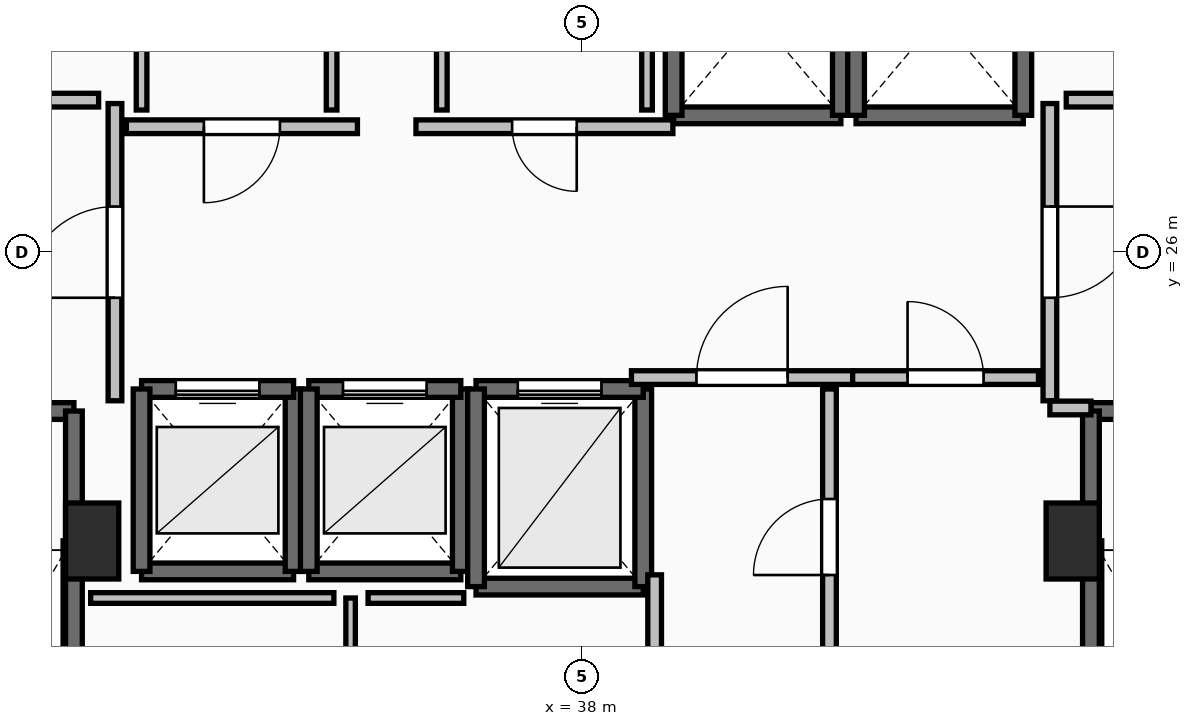
"""IFC4 building model, lengths in metres.
Left out: names, types, materials, properties, quantities, classifications, styles, units other than length and angle.
Written with IfcOpenShell. Run it as: python <this file> out.ifc"""

import sys

from ifc_helpers import new_model, si_unit, direction, frame, frame_2d, origin, origin_2d, place, context, subcontext, project, spatial, rectangle, extrude, element, fill, save


model = new_model("IFC4")
c1 = context("Model", 3, precision=1e-05, world=origin(), true_north=direction((0.0, 1.0)))
c2 = subcontext(c1, "Body", "Model", "MODEL_VIEW")
j1 = project(units=[si_unit("LENGTHUNIT", "METRE"), si_unit("PLANEANGLEUNIT", "RADIAN")], contexts=[c1])
p1 = place(None, origin())
s1 = spatial("IfcSite", under=j1, at=p1, CompositionType="ELEMENT")
p2 = place(p1, origin())
s2 = spatial("IfcBuilding", under=s1, at=p2, CompositionType="ELEMENT")
p3 = place(p2, frame((0.0, 0.0, 217.85)))
s3 = spatial("IfcBuildingStorey", under=s2, at=p3, CompositionType="ELEMENT", Elevation=217.85)
for number, where, z_axis, x_axis in (
    (1, (31.55, 22.2, 0.0), (0.0, 0.0, 1.0), (1.0, 0.0, 0.0)),
    (2, (44.45, 22.2, 0.0), (0.0, 0.0, 1.0), (1.0, 0.0, 0.0)),
):
    element("IfcColumn", number, at=place(p3, frame(where, z_axis=z_axis, x_axis=x_axis)), inside=s3, PredefinedType="PILASTER", context=c2, shape_type="SweptSolid", body=[
        extrude(rectangle(XDim=0.7, YDim=1.0, at=origin_2d()), origin(), (0.0, 0.0, 1.0), 3.55),
    ])
p4 = place(p3, frame((27.94, 23.91, 0.0), z_axis=(0.0, 0.0, 1.0), x_axis=(1.0, 0.0, 0.0)))
e3 = element("IfcWall", 3, at=p4, inside=s3, PredefinedType="SOLIDWALL", context=c2, shape_type="SweptSolid", body=[
    extrude(rectangle(XDim=3.37, YDim=0.22, at=frame_2d((1.685, 0.0))), origin(), (0.0, 0.0, 1.0), 3.29),
])
p5 = place(p4, frame((1.135, 0.0, 0.0)))
e4 = element("IfcOpeningElement", 4, at=p5, cuts=e3, PredefinedType="OPENING", context=c2, shape_type="SweptSolid", body=[
    extrude(rectangle(XDim=1.1, YDim=2.15, at=frame_2d((0.55, 1.075))), frame((0.0, 0.125, 0.0), z_axis=(0.0, -1.0, 0.0), x_axis=(1.0, 0.0, 0.0)), (0.0, 0.0, 1.0), 0.25),
])
p6 = place(p3, frame((31.31, 23.91, 0.0), z_axis=(0.0, 0.0, 1.0), x_axis=(0.0, -1.0, 0.0)))
e5 = element("IfcWall", 5, at=p6, inside=s3, PredefinedType="SOLIDWALL", context=c2, shape_type="SweptSolid", body=[
    extrude(rectangle(XDim=7.42, YDim=0.22, at=frame_2d((3.71, 0.0))), origin(), (0.0, 0.0, 1.0), 3.29),
])
p7 = place(p3, frame((44.69, 23.91, 0.0), z_axis=(0.0, 0.0, 1.0), x_axis=(1.0, 0.0, 0.0)))
e6 = element("IfcWall", 6, at=p7, inside=s3, PredefinedType="SOLIDWALL", context=c2, shape_type="SweptSolid", body=[
    extrude(rectangle(XDim=3.37, YDim=0.22, at=frame_2d((1.685, 0.0))), origin(), (0.0, 0.0, 1.0), 3.29),
])
p8 = place(p7, frame((1.135, 0.0, 0.0)))
e7 = element("IfcOpeningElement", 7, at=p8, cuts=e6, PredefinedType="OPENING", context=c2, shape_type="SweptSolid", body=[
    extrude(rectangle(XDim=1.1, YDim=2.15, at=frame_2d((0.55, 1.075))), frame((0.0, 0.125, 0.0), z_axis=(0.0, -1.0, 0.0), x_axis=(1.0, 0.0, 0.0)), (0.0, 0.0, 1.0), 0.25),
])
p9 = place(p3, frame((44.69, 16.49, 0.0), z_axis=(0.0, 0.0, 1.0), x_axis=(0.0, 1.0, 0.0)))
e8 = element("IfcWall", 8, at=p9, inside=s3, PredefinedType="SOLIDWALL", context=c2, shape_type="SweptSolid", body=[
    extrude(rectangle(XDim=7.42, YDim=0.22, at=frame_2d((3.71, 0.0))), origin(), (0.0, 0.0, 1.0), 3.29),
])
p10 = place(p3, frame((32.2, 21.8, 0.0), z_axis=(0.0, 0.0, 1.0), x_axis=(1.0, 0.0, 0.0)))
e9 = element("IfcWall", 9, at=p10, inside=s3, PredefinedType="SOLIDWALL", context=c2, shape_type="SweptSolid", body=[
    extrude(rectangle(XDim=2.0, YDim=0.22, at=frame_2d((1.0, 0.0))), origin(), (0.0, 0.0, 1.0), 3.29),
])
p11 = place(p3, frame((34.2, 21.8, 0.0), z_axis=(0.0, 0.0, 1.0), x_axis=(0.0, 1.0, 0.0)))
e10 = element("IfcWall", 10, at=p11, inside=s3, PredefinedType="SOLIDWALL", context=c2, shape_type="SweptSolid", body=[
    extrude(rectangle(XDim=2.4, YDim=0.22, at=frame_2d((1.2, 0.0))), origin(), (0.0, 0.0, 1.0), 3.29),
])
p12 = place(p3, frame((34.2, 24.2, 0.0), z_axis=(0.0, 0.0, 1.0), x_axis=(-1.0, 0.0, 0.0)))
e11 = element("IfcWall", 11, at=p12, inside=s3, PredefinedType="SOLIDWALL", context=c2, shape_type="SweptSolid", body=[
    extrude(rectangle(XDim=2.0, YDim=0.22, at=frame_2d((1.0, 0.0))), origin(), (0.0, 0.0, 1.0), 3.29),
])
p13 = place(p12, frame((0.45, 0.0, 0.0)))
e12 = element("IfcOpeningElement", 12, at=p13, cuts=e11, PredefinedType="OPENING", context=c2, shape_type="SweptSolid", body=[
    extrude(rectangle(XDim=1.1, YDim=2.2, at=frame_2d((0.55, 1.1))), frame((0.0, 0.125, 0.0), z_axis=(0.0, -1.0, 0.0), x_axis=(1.0, 0.0, 0.0)), (0.0, 0.0, 1.0), 0.25),
])
p14 = place(p3, frame((32.2, 24.2, 0.0), z_axis=(0.0, 0.0, 1.0), x_axis=(0.0, -1.0, 0.0)))
e13 = element("IfcWall", 13, at=p14, inside=s3, PredefinedType="SOLIDWALL", context=c2, shape_type="SweptSolid", body=[
    extrude(rectangle(XDim=2.4, YDim=0.22, at=frame_2d((1.2, 0.0))), origin(), (0.0, 0.0, 1.0), 3.29),
])
p15 = place(p3, frame((34.4, 21.8, 0.0), z_axis=(0.0, 0.0, 1.0), x_axis=(1.0, 0.0, 0.0)))
e14 = element("IfcWall", 14, at=p15, inside=s3, PredefinedType="SOLIDWALL", context=c2, shape_type="SweptSolid", body=[
    extrude(rectangle(XDim=2.0, YDim=0.22, at=frame_2d((1.0, 0.0))), origin(), (0.0, 0.0, 1.0), 3.29),
])
p16 = place(p3, frame((36.4, 21.8, 0.0), z_axis=(0.0, 0.0, 1.0), x_axis=(0.0, 1.0, 0.0)))
e15 = element("IfcWall", 15, at=p16, inside=s3, PredefinedType="SOLIDWALL", context=c2, shape_type="SweptSolid", body=[
    extrude(rectangle(XDim=2.4, YDim=0.22, at=frame_2d((1.2, 0.0))), origin(), (0.0, 0.0, 1.0), 3.29),
])
p17 = place(p3, frame((36.4, 24.2, 0.0), z_axis=(0.0, 0.0, 1.0), x_axis=(-1.0, 0.0, 0.0)))
e16 = element("IfcWall", 16, at=p17, inside=s3, PredefinedType="SOLIDWALL", context=c2, shape_type="SweptSolid", body=[
    extrude(rectangle(XDim=2.0, YDim=0.22, at=frame_2d((1.0, 0.0))), origin(), (0.0, 0.0, 1.0), 3.29),
])
p18 = place(p17, frame((0.45, 0.0, 0.0)))
e17 = element("IfcOpeningElement", 17, at=p18, cuts=e16, PredefinedType="OPENING", context=c2, shape_type="SweptSolid", body=[
    extrude(rectangle(XDim=1.1, YDim=2.2, at=frame_2d((0.55, 1.1))), frame((0.0, 0.125, 0.0), z_axis=(0.0, -1.0, 0.0), x_axis=(1.0, 0.0, 0.0)), (0.0, 0.0, 1.0), 0.25),
])
p19 = place(p3, frame((34.4, 24.2, 0.0), z_axis=(0.0, 0.0, 1.0), x_axis=(0.0, -1.0, 0.0)))
e18 = element("IfcWall", 18, at=p19, inside=s3, PredefinedType="SOLIDWALL", context=c2, shape_type="SweptSolid", body=[
    extrude(rectangle(XDim=2.4, YDim=0.22, at=frame_2d((1.2, 0.0))), origin(), (0.0, 0.0, 1.0), 3.29),
])
p20 = place(p3, frame((36.6, 21.6, 0.0), z_axis=(0.0, 0.0, 1.0), x_axis=(1.0, 0.0, 0.0)))
e19 = element("IfcWall", 19, at=p20, inside=s3, PredefinedType="SOLIDWALL", context=c2, shape_type="SweptSolid", body=[
    extrude(rectangle(XDim=2.2, YDim=0.22, at=frame_2d((1.1, 0.0))), origin(), (0.0, 0.0, 1.0), 3.29),
])
p21 = place(p3, frame((38.8, 21.6, 0.0), z_axis=(0.0, 0.0, 1.0), x_axis=(0.0, 1.0, 0.0)))
e20 = element("IfcWall", 20, at=p21, inside=s3, PredefinedType="SOLIDWALL", context=c2, shape_type="SweptSolid", body=[
    extrude(rectangle(XDim=2.6, YDim=0.22, at=frame_2d((1.3, 0.0))), origin(), (0.0, 0.0, 1.0), 3.29),
])
p22 = place(p3, frame((38.8, 24.2, 0.0), z_axis=(0.0, 0.0, 1.0), x_axis=(-1.0, 0.0, 0.0)))
e21 = element("IfcWall", 21, at=p22, inside=s3, PredefinedType="SOLIDWALL", context=c2, shape_type="SweptSolid", body=[
    extrude(rectangle(XDim=2.2, YDim=0.22, at=frame_2d((1.1, 0.0))), origin(), (0.0, 0.0, 1.0), 3.29),
])
p23 = place(p22, frame((0.55, 0.0, 0.0)))
e22 = element("IfcOpeningElement", 22, at=p23, cuts=e21, PredefinedType="OPENING", context=c2, shape_type="SweptSolid", body=[
    extrude(rectangle(XDim=1.1, YDim=2.2, at=frame_2d((0.55, 1.1))), frame((0.0, 0.125, 0.0), z_axis=(0.0, -1.0, 0.0), x_axis=(1.0, 0.0, 0.0)), (0.0, 0.0, 1.0), 0.25),
])
p24 = place(p3, frame((36.6, 24.2, 0.0), z_axis=(0.0, 0.0, 1.0), x_axis=(0.0, -1.0, 0.0)))
e23 = element("IfcWall", 23, at=p24, inside=s3, PredefinedType="SOLIDWALL", context=c2, shape_type="SweptSolid", body=[
    extrude(rectangle(XDim=2.6, YDim=0.22, at=frame_2d((1.3, 0.0))), origin(), (0.0, 0.0, 1.0), 3.29),
])
p25 = place(p3, frame((39.2, 27.8, 0.0), z_axis=(0.0, 0.0, 1.0), x_axis=(1.0, 0.0, 0.0)))
e24 = element("IfcWall", 24, at=p25, inside=s3, PredefinedType="SOLIDWALL", context=c2, shape_type="SweptSolid", body=[
    extrude(rectangle(XDim=2.2, YDim=0.22, at=frame_2d((1.1, 0.0))), origin(), (0.0, 0.0, 1.0), 3.29),
])
for number, where, z_axis, x_axis in (
    (25, (41.4, 27.8, 0.0), (0.0, 0.0, 1.0), (0.0, 1.0, 0.0)),
    (26, (39.2, 30.4, 0.0), (0.0, 0.0, 1.0), (0.0, -1.0, 0.0)),
):
    element("IfcWall", number, at=place(p3, frame(where, z_axis=z_axis, x_axis=x_axis)), inside=s3, PredefinedType="SOLIDWALL", context=c2, shape_type="SweptSolid", body=[
        extrude(rectangle(XDim=2.6, YDim=0.22, at=frame_2d((1.3, 0.0))), origin(), (0.0, 0.0, 1.0), 3.29),
    ])
p26 = place(p3, frame((41.6, 27.8, 0.0), z_axis=(0.0, 0.0, 1.0), x_axis=(1.0, 0.0, 0.0)))
e27 = element("IfcWall", 27, at=p26, inside=s3, PredefinedType="SOLIDWALL", context=c2, shape_type="SweptSolid", body=[
    extrude(rectangle(XDim=2.2, YDim=0.22, at=frame_2d((1.1, 0.0))), origin(), (0.0, 0.0, 1.0), 3.29),
])
for number, where, z_axis, x_axis in (
    (28, (43.8, 27.8, 0.0), (0.0, 0.0, 1.0), (0.0, 1.0, 0.0)),
    (29, (41.6, 30.4, 0.0), (0.0, 0.0, 1.0), (0.0, -1.0, 0.0)),
):
    element("IfcWall", number, at=place(p3, frame(where, z_axis=z_axis, x_axis=x_axis)), inside=s3, PredefinedType="SOLIDWALL", context=c2, shape_type="SweptSolid", body=[
        extrude(rectangle(XDim=2.6, YDim=0.22, at=frame_2d((1.3, 0.0))), origin(), (0.0, 0.0, 1.0), 3.29),
    ])
p27 = place(p3, frame((31.85, 24.045, 0.0), z_axis=(0.0, 0.0, 1.0), x_axis=(0.0, 1.0, 0.0)))
e30 = element("IfcWall", 30, at=p27, inside=s3, PredefinedType="PARTITIONING", context=c2, shape_type="SweptSolid", body=[
    extrude(rectangle(XDim=3.91, YDim=0.18, at=frame_2d((1.955, 0.0))), origin(), (0.0, 0.0, 1.0), 3.29),
])
p28 = place(p27, frame((1.355, 0.0, 0.0)))
e31 = element("IfcOpeningElement", 31, at=p28, cuts=e30, PredefinedType="OPENING", context=c2, shape_type="SweptSolid", body=[
    extrude(rectangle(XDim=1.2, YDim=2.15, at=frame_2d((0.6, 1.075))), frame((0.0, 0.105, 0.0), z_axis=(0.0, -1.0, 0.0), x_axis=(1.0, 0.0, 0.0)), (0.0, 0.0, 1.0), 0.21),
])
p29 = place(p3, frame((44.15, 27.955, 0.0), z_axis=(0.0, 0.0, 1.0), x_axis=(0.0, -1.0, 0.0)))
e32 = element("IfcWall", 32, at=p29, inside=s3, PredefinedType="PARTITIONING", context=c2, shape_type="SweptSolid", body=[
    extrude(rectangle(XDim=3.91, YDim=0.18, at=frame_2d((1.955, 0.0))), origin(), (0.0, 0.0, 1.0), 3.29),
])
p30 = place(p29, frame((1.355, 0.0, 0.0)))
e33 = element("IfcOpeningElement", 33, at=p30, cuts=e32, PredefinedType="OPENING", context=c2, shape_type="SweptSolid", body=[
    extrude(rectangle(XDim=1.2, YDim=2.15, at=frame_2d((0.6, 1.075))), frame((0.0, 0.105, 0.0), z_axis=(0.0, -1.0, 0.0), x_axis=(1.0, 0.0, 0.0)), (0.0, 0.0, 1.0), 0.21),
])
p31 = place(p3, frame((44.15, 23.95, 0.0), z_axis=(0.0, 0.0, 1.0), x_axis=(1.0, 0.0, 0.0)))
e34 = element("IfcWall", 34, at=p31, inside=s3, PredefinedType="PARTITIONING", context=c2, shape_type="SweptSolid", body=[
    extrude(rectangle(XDim=0.54, YDim=0.18, at=frame_2d((0.27, 0.0))), origin(), (0.0, 0.0, 1.0), 3.29),
])
p32 = place(p3, frame((38.645, 24.35, 0.0), z_axis=(0.0, 0.0, 1.0), x_axis=(1.0, 0.0, 0.0)))
e35 = element("IfcWall", 35, at=p32, inside=s3, PredefinedType="PARTITIONING", context=c2, shape_type="SweptSolid", body=[
    extrude(rectangle(XDim=2.91, YDim=0.18, at=frame_2d((1.455, 0.0))), origin(), (0.0, 0.0, 1.0), 3.29),
])
p33 = place(p32, frame((0.855, 0.0, 0.0)))
e36 = element("IfcOpeningElement", 36, at=p33, cuts=e35, PredefinedType="OPENING", context=c2, shape_type="SweptSolid", body=[
    extrude(rectangle(XDim=1.2, YDim=2.15, at=frame_2d((0.6, 1.075))), frame((0.0, 0.105, 0.0), z_axis=(0.0, -1.0, 0.0), x_axis=(1.0, 0.0, 0.0)), (0.0, 0.0, 1.0), 0.21),
])
p34 = place(p3, frame((41.555, 24.35, 0.0), z_axis=(0.0, 0.0, 1.0), x_axis=(1.0, 0.0, 0.0)))
e37 = element("IfcWall", 37, at=p34, inside=s3, PredefinedType="PARTITIONING", context=c2, shape_type="SweptSolid", body=[
    extrude(rectangle(XDim=2.445, YDim=0.18, at=frame_2d((1.223, 0.0))), origin(), (0.0, 0.0, 1.0), 3.29),
])
p35 = place(p34, frame((0.722, 0.0, 0.0)))
e38 = element("IfcOpeningElement", 38, at=p35, cuts=e37, PredefinedType="OPENING", context=c2, shape_type="SweptSolid", body=[
    extrude(rectangle(XDim=1.0, YDim=2.15, at=frame_2d((0.5, 1.075))), frame((0.0, 0.105, 0.0), z_axis=(0.0, -1.0, 0.0), x_axis=(1.0, 0.0, 0.0)), (0.0, 0.0, 1.0), 0.21),
])
p36 = place(p3, frame((35.04, 27.65, 0.0), z_axis=(0.0, 0.0, 1.0), x_axis=(-1.0, 0.0, 0.0)))
e39 = element("IfcWall", 39, at=p36, inside=s3, PredefinedType="PARTITIONING", context=c2, shape_type="SweptSolid", body=[
    extrude(rectangle(XDim=3.04, YDim=0.18, at=frame_2d((1.52, 0.0))), origin(), (0.0, 0.0, 1.0), 3.29),
])
p37 = place(p36, frame((1.02, 0.0, 0.0)))
e40 = element("IfcOpeningElement", 40, at=p37, cuts=e39, PredefinedType="OPENING", context=c2, shape_type="SweptSolid", body=[
    extrude(rectangle(XDim=1.0, YDim=2.15, at=frame_2d((0.5, 1.075))), frame((0.0, 0.105, 0.0), z_axis=(0.0, -1.0, 0.0), x_axis=(1.0, 0.0, 0.0)), (0.0, 0.0, 1.0), 0.21),
])
p38 = place(p3, frame((39.19, 27.65, 0.0), z_axis=(0.0, 0.0, 1.0), x_axis=(-1.0, 0.0, 0.0)))
e41 = element("IfcWall", 41, at=p38, inside=s3, PredefinedType="PARTITIONING", context=c2, shape_type="SweptSolid", body=[
    extrude(rectangle(XDim=3.38, YDim=0.18, at=frame_2d((1.69, 0.0))), origin(), (0.0, 0.0, 1.0), 3.29),
])
p39 = place(p38, frame((1.265, 0.0, 0.0)))
e42 = element("IfcOpeningElement", 42, at=p39, cuts=e41, PredefinedType="OPENING", context=c2, shape_type="SweptSolid", body=[
    extrude(rectangle(XDim=0.85, YDim=2.1, at=frame_2d((0.425, 1.05))), frame((0.0, 0.105, 0.0), z_axis=(0.0, -1.0, 0.0), x_axis=(1.0, 0.0, 0.0)), (0.0, 0.0, 1.0), 0.21),
])
p40 = place(p3, frame((41.25, 20.305, 0.0), z_axis=(0.0, 0.0, 1.0), x_axis=(0.0, 1.0, 0.0)))
e43 = element("IfcWall", 43, at=p40, inside=s3, PredefinedType="PARTITIONING", context=c2, shape_type="SweptSolid", body=[
    extrude(rectangle(XDim=3.895, YDim=0.18, at=frame_2d((1.948, 0.0))), origin(), (0.0, 0.0, 1.0), 3.29),
])
p41 = place(p40, frame((1.448, 0.0, 0.0)))
e44 = element("IfcOpeningElement", 44, at=p41, cuts=e43, PredefinedType="OPENING", context=c2, shape_type="SweptSolid", body=[
    extrude(rectangle(XDim=1.0, YDim=2.15, at=frame_2d((0.5, 1.075))), frame((0.0, 0.105, 0.0), z_axis=(0.0, -1.0, 0.0), x_axis=(1.0, 0.0, 0.0)), (0.0, 0.0, 1.0), 0.21),
])
p42 = place(p3, frame((38.95, 21.755, 0.0), z_axis=(0.0, 0.0, 1.0), x_axis=(0.0, -1.0, 0.0)))
e45 = element("IfcWall", 45, at=p42, inside=s3, PredefinedType="PARTITIONING", context=c2, shape_type="SweptSolid", body=[
    extrude(rectangle(XDim=5.435, YDim=0.18, at=frame_2d((2.717, 0.0))), origin(), (0.0, 0.0, 1.0), 3.29),
])
p43 = place(p42, frame((2.218, 0.0, 0.0)))
e46 = element("IfcOpeningElement", 46, at=p43, cuts=e45, PredefinedType="OPENING", context=c2, shape_type="SweptSolid", body=[
    extrude(rectangle(XDim=1.0, YDim=2.15, at=frame_2d((0.5, 1.075))), frame((0.0, 0.105, 0.0), z_axis=(0.0, -1.0, 0.0), x_axis=(1.0, 0.0, 0.0)), (0.0, 0.0, 1.0), 0.21),
])
p44 = place(p3, frame((34.95, 16.32, 0.0), z_axis=(0.0, 0.0, 1.0), x_axis=(0.0, 1.0, 0.0)))
e47 = element("IfcWall", 47, at=p44, inside=s3, PredefinedType="PARTITIONING", context=c2, shape_type="SweptSolid", body=[
    extrude(rectangle(XDim=5.13, YDim=0.125, at=frame_2d((2.565, 0.0))), origin(), (0.0, 0.0, 1.0), 3.29),
])
for number, where, z_axis, x_axis in (
    (48, (31.635, 28.0, 0.0), (0.0, 0.0, 1.0), (-1.0, 0.0, 0.0)),
    (49, (45.28, 28.0, 0.0), (0.0, 0.0, 1.0), (-1.0, 0.0, 0.0)),
):
    element("IfcWall", number, at=place(p3, frame(where, z_axis=z_axis, x_axis=x_axis)), inside=s3, PredefinedType="PARTITIONING", context=c2, shape_type="SweptSolid", body=[
        extrude(rectangle(XDim=0.915, YDim=0.18, at=frame_2d((0.458, 0.0))), origin(), (0.0, 0.0, 1.0), 3.29),
    ])
p45 = place(p3, frame((34.73, 21.45, 0.0), z_axis=(0.0, 0.0, 1.0), x_axis=(-1.0, 0.0, 0.0)))
e50 = element("IfcWall", 50, at=p45, inside=s3, PredefinedType="PARTITIONING", context=c2, shape_type="SweptSolid", body=[
    extrude(rectangle(XDim=3.2, YDim=0.14, at=frame_2d((1.6, 0.0))), origin(), (0.0, 0.0, 1.0), 3.29),
])
p46 = place(p3, frame((36.439, 21.45, 0.0), z_axis=(0.0, 0.0, 1.0), x_axis=(-1.0, 0.0, 0.0)))
e51 = element("IfcWall", 51, at=p46, inside=s3, PredefinedType="PARTITIONING", context=c2, shape_type="SweptSolid", body=[
    extrude(rectangle(XDim=1.259, YDim=0.14, at=frame_2d((0.629, 0.0))), origin(), (0.0, 0.0, 1.0), 3.29),
])
for number, where, z_axis, x_axis in (
    (52, (32.2, 30.26, 0.0), (0.0, 0.0, 1.0), (0.0, -1.0, 0.0)),
    (53, (34.7, 27.87, 0.0), (0.0, 0.0, 1.0), (0.0, 1.0, 0.0)),
    (54, (36.15, 30.26, 0.0), (0.0, 0.0, 1.0), (0.0, -1.0, 0.0)),
    (55, (38.85, 27.87, 0.0), (0.0, 0.0, 1.0), (0.0, 1.0, 0.0)),
):
    element("IfcWall", number, at=place(p3, frame(where, z_axis=z_axis, x_axis=x_axis)), inside=s3, PredefinedType="PARTITIONING", context=c2, shape_type="SweptSolid", body=[
        extrude(rectangle(XDim=2.39, YDim=0.14, at=frame_2d((1.195, 0.0))), origin(), (0.0, 0.0, 1.0), 3.29),
    ])
p47 = place(p13, origin())
e56 = element("IfcDoor", 56, at=p47, inside=s3, OperationType="SLIDING_TO_LEFT", PredefinedType="DOOR", context=c2, shape_type="SweptSolid", body=[
    extrude(rectangle(XDim=1.1, YDim=2.2, at=frame_2d((0.55, 1.1))), frame((0.0, 0.025, 0.0), z_axis=(0.0, -1.0, 0.0), x_axis=(1.0, 0.0, 0.0)), (0.0, 0.0, 1.0), 0.05),
])
fill(e12, e56)
p48 = place(p18, origin())
e57 = element("IfcDoor", 57, at=p48, inside=s3, OperationType="SLIDING_TO_LEFT", PredefinedType="DOOR", context=c2, shape_type="SweptSolid", body=[
    extrude(rectangle(XDim=1.1, YDim=2.2, at=frame_2d((0.55, 1.1))), frame((0.0, 0.025, 0.0), z_axis=(0.0, -1.0, 0.0), x_axis=(1.0, 0.0, 0.0)), (0.0, 0.0, 1.0), 0.05),
])
fill(e17, e57)
p49 = place(p23, origin())
e58 = element("IfcDoor", 58, at=p49, inside=s3, OperationType="SLIDING_TO_LEFT", PredefinedType="DOOR", context=c2, shape_type="SweptSolid", body=[
    extrude(rectangle(XDim=1.1, YDim=2.2, at=frame_2d((0.55, 1.1))), frame((0.0, 0.025, 0.0), z_axis=(0.0, -1.0, 0.0), x_axis=(1.0, 0.0, 0.0)), (0.0, 0.0, 1.0), 0.05),
])
fill(e22, e58)
p50 = place(p28, origin())
e59 = element("IfcDoor", 59, at=p50, inside=s3, OperationType="SINGLE_SWING_LEFT", PredefinedType="DOOR", context=c2, shape_type="SweptSolid", body=[
    extrude(rectangle(XDim=1.2, YDim=2.15, at=frame_2d((0.6, 1.075))), frame((0.0, 0.025, 0.0), z_axis=(0.0, -1.0, 0.0), x_axis=(1.0, 0.0, 0.0)), (0.0, 0.0, 1.0), 0.05),
])
fill(e31, e59)
p51 = place(p30, origin())
e60 = element("IfcDoor", 60, at=p51, inside=s3, OperationType="SINGLE_SWING_LEFT", PredefinedType="DOOR", context=c2, shape_type="SweptSolid", body=[
    extrude(rectangle(XDim=1.2, YDim=2.15, at=frame_2d((0.6, 1.075))), frame((0.0, 0.025, 0.0), z_axis=(0.0, -1.0, 0.0), x_axis=(1.0, 0.0, 0.0)), (0.0, 0.0, 1.0), 0.05),
])
fill(e33, e60)
p52 = place(p33, origin())
e61 = element("IfcDoor", 61, at=p52, inside=s3, OperationType="SINGLE_SWING_RIGHT", PredefinedType="DOOR", context=c2, shape_type="SweptSolid", body=[
    extrude(rectangle(XDim=1.2, YDim=2.15, at=frame_2d((0.6, 1.075))), frame((0.0, 0.025, 0.0), z_axis=(0.0, -1.0, 0.0), x_axis=(1.0, 0.0, 0.0)), (0.0, 0.0, 1.0), 0.05),
])
fill(e36, e61)
p53 = place(p35, origin())
e62 = element("IfcDoor", 62, at=p53, inside=s3, OperationType="SINGLE_SWING_LEFT", PredefinedType="DOOR", context=c2, shape_type="SweptSolid", body=[
    extrude(rectangle(XDim=1.0, YDim=2.15, at=frame_2d((0.5, 1.075))), frame((0.0, 0.025, 0.0), z_axis=(0.0, -1.0, 0.0), x_axis=(1.0, 0.0, 0.0)), (0.0, 0.0, 1.0), 0.05),
])
fill(e38, e62)
p54 = place(p37, origin())
e63 = element("IfcDoor", 63, at=p54, inside=s3, OperationType="SINGLE_SWING_RIGHT", PredefinedType="DOOR", context=c2, shape_type="SweptSolid", body=[
    extrude(rectangle(XDim=1.0, YDim=2.15, at=frame_2d((0.5, 1.075))), frame((0.0, 0.025, 0.0), z_axis=(0.0, -1.0, 0.0), x_axis=(1.0, 0.0, 0.0)), (0.0, 0.0, 1.0), 0.05),
])
fill(e40, e63)
p55 = place(p39, origin())
e64 = element("IfcDoor", 64, at=p55, inside=s3, OperationType="SINGLE_SWING_LEFT", PredefinedType="DOOR", context=c2, shape_type="SweptSolid", body=[
    extrude(rectangle(XDim=0.85, YDim=2.1, at=frame_2d((0.425, 1.05))), frame((0.0, 0.025, 0.0), z_axis=(0.0, -1.0, 0.0), x_axis=(1.0, 0.0, 0.0)), (0.0, 0.0, 1.0), 0.05),
])
fill(e42, e64)
p56 = place(p41, origin())
e65 = element("IfcDoor", 65, at=p56, inside=s3, OperationType="SINGLE_SWING_LEFT", PredefinedType="DOOR", context=c2, shape_type="SweptSolid", body=[
    extrude(rectangle(XDim=1.0, YDim=2.15, at=frame_2d((0.5, 1.075))), frame((0.0, 0.025, 0.0), z_axis=(0.0, -1.0, 0.0), x_axis=(1.0, 0.0, 0.0)), (0.0, 0.0, 1.0), 0.05),
])
fill(e44, e65)
save(model, sys.argv[1])
